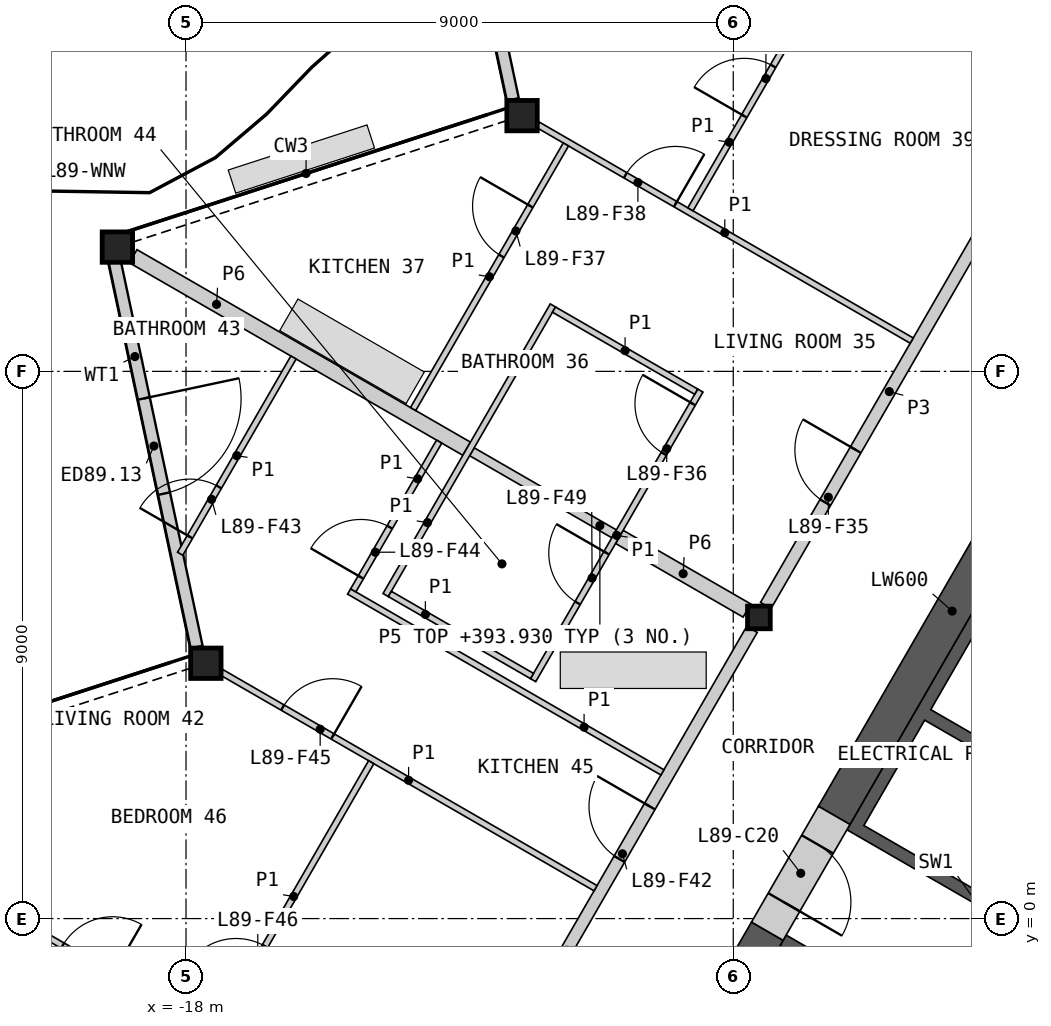
"""IFC4 building model, lengths in metres.
Left out: names, types, materials, properties, quantities, classifications, styles, units other than length and angle.
Written with IfcOpenShell. Run it as: python <this file> out.ifc"""

import sys

from ifc_helpers import new_model, si_unit, direction, frame, frame_2d, origin, origin_2d, place, context, subcontext, project, spatial, polyline, rectangle, hollow_rectangle, i_section, outline, extrude, element, fill, save


model = new_model("IFC4")
c1 = context("Model", 3, precision=1e-05, world=origin(), true_north=direction((0.0, 1.0)))
c2 = subcontext(c1, "Body", "Model", "MODEL_VIEW")
j1 = project(units=[si_unit("LENGTHUNIT", "METRE"), si_unit("PLANEANGLEUNIT", "RADIAN")], contexts=[c1])
p1 = place(None, origin())
s1 = spatial("IfcSite", under=j1, at=p1, CompositionType="ELEMENT")
p2 = place(p1, origin())
s2 = spatial("IfcBuilding", under=s1, at=p2, CompositionType="ELEMENT")
p3 = place(p2, frame((0.0, 0.0, 391.6)))
s3 = spatial("IfcBuildingStorey", under=s2, at=p3, CompositionType="ELEMENT", Elevation=391.6)
for number, where, z_axis, x_axis in (
    (1, (-12.474, 13.206, 0.0), (0.0, 0.0, 1.0), (1.0, 0.0, 0.0)),
    (2, (-19.129, 11.044, 0.0), (0.0, 0.0, 1.0), (1.0, 0.0, 0.0)),
    (3, (-17.674, 4.199, 0.0), (0.0, 0.0, 1.0), (1.0, 0.0, 0.0)),
):
    element("IfcColumn", number, at=place(p3, frame(where, z_axis=z_axis, x_axis=x_axis)), inside=s3, PredefinedType="COLUMN", context=c2, shape_type="SweptSolid", body=[
        extrude(hollow_rectangle(XDim=0.5, YDim=0.5, WallThickness=0.03, at=origin_2d()), origin(), (0.0, 0.0, 1.0), 3.4),
    ])
p4 = place(p3, frame((-8.578, 4.953, 0.0), z_axis=(0.0, 0.0, 1.0), x_axis=(1.0, 0.0, 0.0)))
e4 = element("IfcColumn", 4, at=p4, inside=s3, PredefinedType="COLUMN", context=c2, shape_type="SweptSolid", body=[
    extrude(i_section(OverallWidth=0.374, OverallDepth=0.372, WebThickness=0.016, FlangeThickness=0.026, at=origin_2d()), origin(), (0.0, 0.0, 1.0), 3.4),
])
p5 = place(p3, frame((-13.979, 19.843, 0.0), z_axis=(0.0, 0.0, 1.0), x_axis=(0.207910765171, -0.978147797486, 0.0)))
e5 = element("IfcWall", 5, at=p5, inside=s3, PredefinedType="SOLIDWALL", context=c2, shape_type="SweptSolid", body=[
    extrude(rectangle(XDim=6.512, YDim=0.2, at=frame_2d((3.256, 0.0))), origin(), (0.0, 0.0, 1.0), 2.634),
])
p6 = place(p5, frame((2.333, 0.0, 0.0)))
e6 = element("IfcOpeningElement", 6, at=p6, cuts=e5, PredefinedType="OPENING", context=c2, shape_type="SweptSolid", body=[
    extrude(rectangle(XDim=1.6, YDim=2.25, at=frame_2d((0.8, 1.125))), frame((0.0, 0.11, 0.0), z_axis=(0.0, -1.0, 0.0), x_axis=(1.0, 0.0, 0.0)), (0.0, 0.0, 1.0), 0.22),
])
p7 = place(p3, frame((-19.179, 10.836, 0.0), z_axis=(0.0, 0.0, 1.0), x_axis=(0.207910765171, -0.978147797486, 0.0)))
e7 = element("IfcWall", 7, at=p7, inside=s3, PredefinedType="SOLIDWALL", context=c2, shape_type="SweptSolid", body=[
    extrude(rectangle(XDim=6.512, YDim=0.2, at=frame_2d((3.256, 0.0))), origin(), (0.0, 0.0, 1.0), 2.634),
])
p8 = place(p7, frame((2.333, 0.0, 0.0)))
e8 = element("IfcOpeningElement", 8, at=p8, cuts=e7, PredefinedType="OPENING", context=c2, shape_type="SweptSolid", body=[
    extrude(rectangle(XDim=1.6, YDim=2.25, at=frame_2d((0.8, 1.125))), frame((0.0, 0.11, 0.0), z_axis=(0.0, -1.0, 0.0), x_axis=(1.0, 0.0, 0.0)), (0.0, 0.0, 1.0), 0.22),
])
p9 = place(p3, origin())
e9 = element("IfcWall", 9, at=p9, inside=s3, PredefinedType="SHEAR", context=c2, shape_type="SweptSolid", body=[
    extrude(outline(polyline([(-6.061, -1.697), (-8.231, -0.444), (-8.131, -0.271), (-5.96, -1.524), (-6.061, -1.697)])), origin(), (0.0, 0.0, 1.0), 3.1),
])
p10 = place(p3, origin())
e10 = element("IfcWall", 10, at=p10, inside=s3, PredefinedType="SHEAR", context=c2, shape_type="SweptSolid", body=[
    extrude(outline(polyline([(-4.96, 0.208), (-7.131, 1.461), (-3.731, 7.35), (-1.561, 6.097), (-1.66, 5.924), (-3.652, 7.074), (-5.752, 3.437), (-3.76, 2.287), (-3.861, 2.113), (-5.852, 3.263), (-6.852, 1.531), (-4.861, 0.381), (-4.96, 0.208)])), origin(), (0.0, 0.0, 1.0), 3.1),
])
p11 = place(p3, frame((-3.461, 8.417, 0.0), z_axis=(0.0, 0.0, 1.0), x_axis=(-0.50000391502, -0.866023143435, 0.0)))
e11 = element("IfcWall", 11, at=p11, inside=s3, PredefinedType="SHEAR", context=c2, shape_type="SweptSolid", body=[
    extrude(rectangle(XDim=7.759, YDim=0.6, at=frame_2d((3.879, 0.0))), origin(), (0.0, 0.0, 1.0), 3.1),
])
p12 = place(p3, frame((-8.44, -0.208, 0.0), z_axis=(0.0, 0.0, 1.0), x_axis=(-0.500007425856, -0.866021116422, 0.0)))
e12 = element("IfcWall", 12, at=p12, inside=s3, PredefinedType="SHEAR", context=c2, shape_type="SweptSolid", body=[
    extrude(rectangle(XDim=4.969, YDim=0.6, at=frame_2d((2.484, 0.0))), origin(), (0.0, 0.0, 1.0), 3.1),
])
p13 = place(p3, frame((-7.34, 1.698, 0.0), z_axis=(0.0, 0.0, 1.0), x_axis=(-0.50002983664, -0.866008176907, 0.0)))
e13 = element("IfcWall", 13, at=p13, inside=s3, PredefinedType="SHEAR", context=c2, shape_type="SweptSolid", body=[
    extrude(rectangle(XDim=2.2, YDim=0.6, at=frame_2d((1.1, 0.0))), origin(), (0.0, 0.0, 1.0), 3.1),
])
p14 = place(p13, frame((0.55, 0.0, 0.0)))
e14 = element("IfcOpeningElement", 14, at=p14, cuts=e13, PredefinedType="OPENING", context=c2, shape_type="SweptSolid", body=[
    extrude(rectangle(XDim=1.1, YDim=2.1, at=frame_2d((0.55, 1.05))), frame((0.0, 0.31, 0.0), z_axis=(0.0, -1.0, 0.0), x_axis=(1.0, 0.0, 0.0)), (0.0, 0.0, 1.0), 0.62),
])
p15 = place(p3, frame((-8.465, 5.15, 0.0), z_axis=(0.0, 0.0, 1.0), x_axis=(0.499992155518, 0.866029932751, 0.0)))
e15 = element("IfcWall", 15, at=p15, inside=s3, PredefinedType="PARTITIONING", context=c2, shape_type="SweptSolid", body=[
    extrude(rectangle(XDim=8.123, YDim=0.2, at=frame_2d((4.062, 0.0))), origin(), (0.0, 0.0, 1.0), 3.1),
])
p16 = place(p15, frame((1.956, 0.0, 0.0)))
e16 = element("IfcOpeningElement", 16, at=p16, cuts=e15, PredefinedType="OPENING", context=c2, shape_type="SweptSolid", body=[
    extrude(rectangle(XDim=1.0, YDim=2.1, at=frame_2d((0.5, 1.05))), frame((0.0, 0.11, 0.0), z_axis=(0.0, -1.0, 0.0), x_axis=(1.0, 0.0, 0.0)), (0.0, 0.0, 1.0), 0.22),
])
p17 = place(p3, frame((-12.754, -2.279, 0.0), z_axis=(0.0, 0.0, 1.0), x_axis=(0.500001682468, 0.866024432409, 0.0)))
e17 = element("IfcWall", 17, at=p17, inside=s3, PredefinedType="PARTITIONING", context=c2, shape_type="SweptSolid", body=[
    extrude(rectangle(XDim=8.124, YDim=0.2, at=frame_2d((4.062, 0.0))), origin(), (0.0, 0.0, 1.0), 3.1),
])
p18 = place(p17, frame((3.762, 0.0, 0.0)))
e18 = element("IfcOpeningElement", 18, at=p18, cuts=e17, PredefinedType="OPENING", context=c2, shape_type="SweptSolid", body=[
    extrude(rectangle(XDim=1.0, YDim=2.1, at=frame_2d((0.5, 1.05))), frame((0.0, 0.11, 0.0), z_axis=(0.0, -1.0, 0.0), x_axis=(1.0, 0.0, 0.0)), (0.0, 0.0, 1.0), 0.22),
])
p19 = place(p3, frame((-18.869, 10.894, 0.0), z_axis=(0.0, 0.0, 1.0), x_axis=(0.866023139795, -0.500003921324, 0.0)))
e19 = element("IfcWall", 19, at=p19, inside=s3, PredefinedType="PARTITIONING", context=c2, shape_type="SweptSolid", body=[
    extrude(rectangle(XDim=6.332, YDim=0.25, at=frame_2d((3.166, 0.0))), origin(), (0.0, 0.0, 1.0), 2.33),
])
p20 = place(p3, frame((-10.873, 6.278, 0.0), z_axis=(0.0, 0.0, 1.0), x_axis=(0.865989219354, -0.500062668036, 0.0)))
e20 = element("IfcWall", 20, at=p20, inside=s3, PredefinedType="PARTITIONING", context=c2, shape_type="SweptSolid", body=[
    extrude(rectangle(XDim=2.423, YDim=0.25, at=frame_2d((1.211, 0.0))), origin(), (0.0, 0.0, 1.0), 2.33),
])
p21 = place(p3, frame((-13.298, 7.678, 0.0), z_axis=(0.0, 0.0, 1.0), x_axis=(0.866059108428, -0.4999416173, 0.0)))
e21 = element("IfcWall", 21, at=p21, inside=s3, PredefinedType="PLUMBINGWALL", context=c2, shape_type="SweptSolid", body=[
    extrude(rectangle(XDim=2.7, YDim=0.15, at=frame_2d((1.35, 0.0))), origin(), (0.0, 0.0, 1.0), 2.33),
])
p22 = place(p3, frame((-13.669, 19.9, 0.0), z_axis=(0.0, 0.0, 1.0), x_axis=(0.866032376801, -0.499987922186, 0.0)))
e22 = element("IfcWall", 22, at=p22, inside=s3, PredefinedType="PARTITIONING", context=c2, shape_type="SweptSolid", body=[
    extrude(rectangle(XDim=11.782, YDim=0.1, at=frame_2d((5.891, 0.0))), origin(), (0.0, 0.0, 1.0), 2.33),
])
p23 = place(p22, frame((4.664, 0.0, 0.0)))
e23 = element("IfcOpeningElement", 23, at=p23, cuts=e22, PredefinedType="OPENING", context=c2, shape_type="SweptSolid", body=[
    extrude(rectangle(XDim=0.95, YDim=2.1, at=frame_2d((0.475, 1.05))), frame((0.0, 0.06, 0.0), z_axis=(0.0, -1.0, 0.0), x_axis=(1.0, 0.0, 0.0)), (0.0, 0.0, 1.0), 0.12),
])
p24 = place(p3, frame((-24.069, 1.887, 0.0), z_axis=(0.0, 0.0, 1.0), x_axis=(0.866023404247, -0.500003463284, 0.0)))
e24 = element("IfcWall", 24, at=p24, inside=s3, PredefinedType="PARTITIONING", context=c2, shape_type="SweptSolid", body=[
    extrude(rectangle(XDim=11.782, YDim=0.1, at=frame_2d((5.891, 0.0))), origin(), (0.0, 0.0, 1.0), 2.33),
])
p25 = place(p24, frame((4.664, 0.0, 0.0)))
e25 = element("IfcOpeningElement", 25, at=p25, cuts=e24, PredefinedType="OPENING", context=c2, shape_type="SweptSolid", body=[
    extrude(rectangle(XDim=0.95, YDim=2.1, at=frame_2d((0.475, 1.05))), frame((0.0, 0.06, 0.0), z_axis=(0.0, -1.0, 0.0), x_axis=(1.0, 0.0, 0.0)), (0.0, 0.0, 1.0), 0.12),
])
p26 = place(p3, frame((-12.214, 13.056, 0.0), z_axis=(0.0, 0.0, 1.0), x_axis=(0.866018949465, -0.500011179042, 0.0)))
e26 = element("IfcWall", 26, at=p26, inside=s3, PredefinedType="PARTITIONING", context=c2, shape_type="SweptSolid", body=[
    extrude(rectangle(XDim=7.1, YDim=0.1, at=frame_2d((3.55, 0.0))), origin(), (0.0, 0.0, 1.0), 2.33),
])
p27 = place(p26, frame((1.663, 0.0, 0.0)))
e27 = element("IfcOpeningElement", 27, at=p27, cuts=e26, PredefinedType="OPENING", context=c2, shape_type="SweptSolid", body=[
    extrude(rectangle(XDim=0.95, YDim=2.1, at=frame_2d((0.475, 1.05))), frame((0.0, 0.06, 0.0), z_axis=(0.0, -1.0, 0.0), x_axis=(1.0, 0.0, 0.0)), (0.0, 0.0, 1.0), 0.12),
])
p28 = place(p3, frame((-17.414, 4.049, 0.0), z_axis=(0.0, 0.0, 1.0), x_axis=(0.866033839264, -0.499985389037, 0.0)))
e28 = element("IfcWall", 28, at=p28, inside=s3, PredefinedType="PARTITIONING", context=c2, shape_type="SweptSolid", body=[
    extrude(rectangle(XDim=7.1, YDim=0.1, at=frame_2d((3.55, 0.0))), origin(), (0.0, 0.0, 1.0), 2.33),
])
p29 = place(p28, frame((1.158, 0.0, 0.0)))
e29 = element("IfcOpeningElement", 29, at=p29, cuts=e28, PredefinedType="OPENING", context=c2, shape_type="SweptSolid", body=[
    extrude(rectangle(XDim=0.95, YDim=2.1, at=frame_2d((0.475, 1.05))), frame((0.0, 0.06, 0.0), z_axis=(0.0, -1.0, 0.0), x_axis=(1.0, 0.0, 0.0)), (0.0, 0.0, 1.0), 0.12),
])
p30 = place(p3, frame((-15.318, 5.38, 0.0), z_axis=(0.0, 0.0, 1.0), x_axis=(0.866035260786, -0.499982926783, 0.0)))
e30 = element("IfcWall", 30, at=p30, inside=s3, PredefinedType="PARTITIONING", context=c2, shape_type="SweptSolid", body=[
    extrude(rectangle(XDim=5.95, YDim=0.1, at=frame_2d((2.975, 0.0))), origin(), (0.0, 0.0, 1.0), 2.33),
])
p31 = place(p3, frame((-14.717, 5.321, 0.0), z_axis=(0.0, 0.0, 1.0), x_axis=(0.500015767406, 0.866016300277, 0.0)))
e31 = element("IfcWall", 31, at=p31, inside=s3, PredefinedType="PARTITIONING", context=c2, shape_type="SweptSolid", body=[
    extrude(rectangle(XDim=5.5, YDim=0.1, at=frame_2d((2.75, 0.0))), origin(), (0.0, 0.0, 1.0), 2.33),
])
p32 = place(p3, frame((-12.292, 3.921, 0.0), z_axis=(0.0, 0.0, 1.0), x_axis=(0.499996545922, 0.866027397988, 0.0)))
e32 = element("IfcWall", 32, at=p32, inside=s3, PredefinedType="PARTITIONING", context=c2, shape_type="SweptSolid", body=[
    extrude(rectangle(XDim=5.5, YDim=0.1, at=frame_2d((2.75, 0.0))), origin(), (0.0, 0.0, 1.0), 2.33),
])
p33 = place(p32, frame((4.3, 0.0, 0.0)))
e33 = element("IfcOpeningElement", 33, at=p33, cuts=e32, PredefinedType="OPENING", context=c2, shape_type="SweptSolid", body=[
    extrude(rectangle(XDim=0.95, YDim=2.1, at=frame_2d((0.475, 1.05))), frame((0.0, 0.06, 0.0), z_axis=(0.0, -1.0, 0.0), x_axis=(1.0, 0.0, 0.0)), (0.0, 0.0, 1.0), 0.12),
])
p34 = place(p32, frame((1.465, 0.0, 0.0)))
e34 = element("IfcOpeningElement", 34, at=p34, cuts=e32, PredefinedType="OPENING", context=c2, shape_type="SweptSolid", body=[
    extrude(rectangle(XDim=0.95, YDim=2.1, at=frame_2d((0.475, 1.05))), frame((0.0, 0.06, 0.0), z_axis=(0.0, -1.0, 0.0), x_axis=(1.0, 0.0, 0.0)), (0.0, 0.0, 1.0), 0.12),
])
p35 = place(p3, frame((-9.704, 11.665, 0.0), z_axis=(0.0, 0.0, 1.0), x_axis=(0.499984882974, 0.866034131428, 0.0)))
e35 = element("IfcWall", 35, at=p35, inside=s3, PredefinedType="PARTITIONING", context=c2, shape_type="SweptSolid", body=[
    extrude(rectangle(XDim=5.1, YDim=0.1, at=frame_2d((2.55, 0.0))), origin(), (0.0, 0.0, 1.0), 2.33),
])
p36 = place(p35, frame((1.771, 0.0, 0.0)))
e36 = element("IfcOpeningElement", 36, at=p36, cuts=e35, PredefinedType="OPENING", context=c2, shape_type="SweptSolid", body=[
    extrude(rectangle(XDim=0.95, YDim=2.1, at=frame_2d((0.475, 1.05))), frame((0.0, 0.06, 0.0), z_axis=(0.0, -1.0, 0.0), x_axis=(1.0, 0.0, 0.0)), (0.0, 0.0, 1.0), 0.12),
])
p37 = place(p3, frame((-17.504, -1.845, 0.0), z_axis=(0.0, 0.0, 1.0), x_axis=(0.499984882974, 0.866034131428, 0.0)))
e37 = element("IfcWall", 37, at=p37, inside=s3, PredefinedType="PARTITIONING", context=c2, shape_type="SweptSolid", body=[
    extrude(rectangle(XDim=5.1, YDim=0.1, at=frame_2d((2.55, 0.0))), origin(), (0.0, 0.0, 1.0), 2.33),
])
p38 = place(p37, frame((0.656, 0.0, 0.0)))
e38 = element("IfcOpeningElement", 38, at=p38, cuts=e37, PredefinedType="OPENING", context=c2, shape_type="SweptSolid", body=[
    extrude(rectangle(XDim=0.95, YDim=2.1, at=frame_2d((0.475, 1.05))), frame((0.0, 0.06, 0.0), z_axis=(0.0, -1.0, 0.0), x_axis=(1.0, 0.0, 0.0)), (0.0, 0.0, 1.0), 0.12),
])
p39 = place(p3, frame((-14.265, 8.38, 0.0), z_axis=(0.0, 0.0, 1.0), x_axis=(0.500026652407, 0.866010015463, 0.0)))
e39 = element("IfcWall", 39, at=p39, inside=s3, PredefinedType="PARTITIONING", context=c2, shape_type="SweptSolid", body=[
    extrude(rectangle(XDim=5.025, YDim=0.1, at=frame_2d((2.513, 0.0))), origin(), (0.0, 0.0, 1.0), 2.33),
])
p40 = place(p39, frame((2.906, 0.0, 0.0)))
e40 = element("IfcOpeningElement", 40, at=p40, cuts=e39, PredefinedType="OPENING", context=c2, shape_type="SweptSolid", body=[
    extrude(rectangle(XDim=0.95, YDim=2.1, at=frame_2d((0.475, 1.05))), frame((0.0, 0.06, 0.0), z_axis=(0.0, -1.0, 0.0), x_axis=(1.0, 0.0, 0.0)), (0.0, 0.0, 1.0), 0.12),
])
p41 = place(p3, frame((-18.096, 6.0, 0.0), z_axis=(0.0, 0.0, 1.0), x_axis=(0.500000333706, 0.866025211119, 0.0)))
e41 = element("IfcWall", 41, at=p41, inside=s3, PredefinedType="PARTITIONING", context=c2, shape_type="SweptSolid", body=[
    extrude(rectangle(XDim=3.727, YDim=0.1, at=frame_2d((1.863, 0.0))), origin(), (0.0, 0.0, 1.0), 2.33),
])
p42 = place(p41, frame((0.321, 0.0, 0.0)))
e42 = element("IfcOpeningElement", 42, at=p42, cuts=e41, PredefinedType="OPENING", context=c2, shape_type="SweptSolid", body=[
    extrude(rectangle(XDim=0.95, YDim=2.1, at=frame_2d((0.475, 1.05))), frame((0.0, 0.06, 0.0), z_axis=(0.0, -1.0, 0.0), x_axis=(1.0, 0.0, 0.0)), (0.0, 0.0, 1.0), 0.12),
])
p43 = place(p3, frame((-15.25, 5.398, 0.0), z_axis=(0.0, 0.0, 1.0), x_axis=(0.499959355765, 0.866048868473, 0.0)))
e43 = element("IfcWall", 43, at=p43, inside=s3, PredefinedType="PARTITIONING", context=c2, shape_type="SweptSolid", body=[
    extrude(rectangle(XDim=2.825, YDim=0.1, at=frame_2d((1.413, 0.0))), origin(), (0.0, 0.0, 1.0), 2.33),
])
p44 = place(p43, frame((0.25, 0.0, 0.0)))
e44 = element("IfcOpeningElement", 44, at=p44, cuts=e43, PredefinedType="OPENING", context=c2, shape_type="SweptSolid", body=[
    extrude(rectangle(XDim=0.95, YDim=2.1, at=frame_2d((0.475, 1.05))), frame((0.0, 0.06, 0.0), z_axis=(0.0, -1.0, 0.0), x_axis=(1.0, 0.0, 0.0)), (0.0, 0.0, 1.0), 0.12),
])
for number, where, z_axis, x_axis in (
    (45, (-11.948, 10.016, 0.0), (0.0, 0.0, 1.0), (0.866, -0.5, 0.0)),
    (46, (-14.648, 5.34, 0.0), (0.0, 0.0, 1.0), (0.866, -0.5, 0.0)),
):
    element("IfcWall", number, at=place(p3, frame(where, z_axis=z_axis, x_axis=x_axis)), inside=s3, PredefinedType="PARTITIONING", context=c2, shape_type="SweptSolid", body=[
        extrude(rectangle(XDim=2.7, YDim=0.1, at=frame_2d((1.35, 0.0))), origin(), (0.0, 0.0, 1.0), 2.33),
    ])
p45 = place(p8, origin())
e47 = element("IfcDoor", 47, at=p45, inside=s3, OperationType="DOUBLE_DOOR_SINGLE_SWING", PredefinedType="DOOR", context=c2, shape_type="SweptSolid", body=[
    extrude(rectangle(XDim=1.6, YDim=2.25, at=frame_2d((0.8, 1.125))), frame((0.0, 0.025, 0.0), z_axis=(0.0, -1.0, 0.0), x_axis=(1.0, 0.0, 0.0)), (0.0, 0.0, 1.0), 0.05),
])
fill(e8, e47)
p46 = place(p14, origin())
e48 = element("IfcDoor", 48, at=p46, inside=s3, OperationType="SINGLE_SWING_RIGHT", PredefinedType="DOOR", context=c2, shape_type="SweptSolid", body=[
    extrude(rectangle(XDim=1.1, YDim=2.1, at=frame_2d((0.55, 1.05))), frame((0.0, 0.055, 0.0), z_axis=(0.0, -1.0, 0.0), x_axis=(1.0, 0.0, 0.0)), (0.0, 0.0, 1.0), 0.05),
])
fill(e14, e48)
p47 = place(p16, origin())
e49 = element("IfcDoor", 49, at=p47, inside=s3, OperationType="SINGLE_SWING_RIGHT", PredefinedType="DOOR", context=c2, shape_type="SweptSolid", body=[
    extrude(rectangle(XDim=1.0, YDim=2.1, at=frame_2d((0.5, 1.05))), frame((0.0, 0.025, 0.0), z_axis=(0.0, -1.0, 0.0), x_axis=(1.0, 0.0, 0.0)), (0.0, 0.0, 1.0), 0.05),
])
fill(e16, e49)
p48 = place(p33, origin())
e50 = element("IfcDoor", 50, at=p48, inside=s3, OperationType="SINGLE_SWING_RIGHT", PredefinedType="DOOR", context=c2, shape_type="SweptSolid", body=[
    extrude(rectangle(XDim=0.95, YDim=2.1, at=frame_2d((0.475, 1.05))), frame((0.0, 0.025, 0.0), z_axis=(0.0, -1.0, 0.0), x_axis=(1.0, 0.0, 0.0)), (0.0, 0.0, 1.0), 0.05),
])
fill(e33, e50)
p49 = place(p40, origin())
e51 = element("IfcDoor", 51, at=p49, inside=s3, OperationType="SINGLE_SWING_RIGHT", PredefinedType="DOOR", context=c2, shape_type="SweptSolid", body=[
    extrude(rectangle(XDim=0.95, YDim=2.1, at=frame_2d((0.475, 1.05))), frame((0.0, 0.025, 0.0), z_axis=(0.0, -1.0, 0.0), x_axis=(1.0, 0.0, 0.0)), (0.0, 0.0, 1.0), 0.05),
])
fill(e40, e51)
p50 = place(p27, origin())
e52 = element("IfcDoor", 52, at=p50, inside=s3, OperationType="SINGLE_SWING_RIGHT", PredefinedType="DOOR", context=c2, shape_type="SweptSolid", body=[
    extrude(rectangle(XDim=0.95, YDim=2.1, at=frame_2d((0.475, 1.05))), frame((0.0, 0.025, 0.0), z_axis=(0.0, -1.0, 0.0), x_axis=(1.0, 0.0, 0.0)), (0.0, 0.0, 1.0), 0.05),
])
fill(e27, e52)
p51 = place(p36, origin())
e53 = element("IfcDoor", 53, at=p51, inside=s3, OperationType="SINGLE_SWING_LEFT", PredefinedType="DOOR", context=c2, shape_type="SweptSolid", body=[
    extrude(rectangle(XDim=0.95, YDim=2.1, at=frame_2d((0.475, 1.05))), frame((0.0, 0.025, 0.0), z_axis=(0.0, -1.0, 0.0), x_axis=(1.0, 0.0, 0.0)), (0.0, 0.0, 1.0), 0.05),
])
fill(e36, e53)
p52 = place(p18, origin())
e54 = element("IfcDoor", 54, at=p52, inside=s3, OperationType="SINGLE_SWING_RIGHT", PredefinedType="DOOR", context=c2, shape_type="SweptSolid", body=[
    extrude(rectangle(XDim=1.0, YDim=2.1, at=frame_2d((0.5, 1.05))), frame((0.0, 0.025, 0.0), z_axis=(0.0, -1.0, 0.0), x_axis=(1.0, 0.0, 0.0)), (0.0, 0.0, 1.0), 0.05),
])
fill(e18, e54)
p53 = place(p42, origin())
e55 = element("IfcDoor", 55, at=p53, inside=s3, OperationType="SINGLE_SWING_LEFT", PredefinedType="DOOR", context=c2, shape_type="SweptSolid", body=[
    extrude(rectangle(XDim=0.95, YDim=2.1, at=frame_2d((0.475, 1.05))), frame((0.0, 0.025, 0.0), z_axis=(0.0, -1.0, 0.0), x_axis=(1.0, 0.0, 0.0)), (0.0, 0.0, 1.0), 0.05),
])
fill(e42, e55)
p54 = place(p44, origin())
e56 = element("IfcDoor", 56, at=p54, inside=s3, OperationType="SINGLE_SWING_LEFT", PredefinedType="DOOR", context=c2, shape_type="SweptSolid", body=[
    extrude(rectangle(XDim=0.95, YDim=2.1, at=frame_2d((0.475, 1.05))), frame((0.0, 0.025, 0.0), z_axis=(0.0, -1.0, 0.0), x_axis=(1.0, 0.0, 0.0)), (0.0, 0.0, 1.0), 0.05),
])
fill(e44, e56)
p55 = place(p29, origin())
e57 = element("IfcDoor", 57, at=p55, inside=s3, OperationType="SINGLE_SWING_RIGHT", PredefinedType="DOOR", context=c2, shape_type="SweptSolid", body=[
    extrude(rectangle(XDim=0.95, YDim=2.1, at=frame_2d((0.475, 1.05))), frame((0.0, 0.025, 0.0), z_axis=(0.0, -1.0, 0.0), x_axis=(1.0, 0.0, 0.0)), (0.0, 0.0, 1.0), 0.05),
])
fill(e29, e57)
p56 = place(p38, origin())
e58 = element("IfcDoor", 58, at=p56, inside=s3, OperationType="SINGLE_SWING_LEFT", PredefinedType="DOOR", context=c2, shape_type="SweptSolid", body=[
    extrude(rectangle(XDim=0.95, YDim=2.1, at=frame_2d((0.475, 1.05))), frame((0.0, 0.025, 0.0), z_axis=(0.0, -1.0, 0.0), x_axis=(1.0, 0.0, 0.0)), (0.0, 0.0, 1.0), 0.05),
])
fill(e38, e58)
p57 = place(p25, origin())
e59 = element("IfcDoor", 59, at=p57, inside=s3, OperationType="SINGLE_SWING_RIGHT", PredefinedType="DOOR", context=c2, shape_type="SweptSolid", body=[
    extrude(rectangle(XDim=0.95, YDim=2.1, at=frame_2d((0.475, 1.05))), frame((0.0, 0.025, 0.0), z_axis=(0.0, -1.0, 0.0), x_axis=(1.0, 0.0, 0.0)), (0.0, 0.0, 1.0), 0.05),
])
fill(e25, e59)
p58 = place(p34, origin())
e60 = element("IfcDoor", 60, at=p58, inside=s3, OperationType="SINGLE_SWING_RIGHT", PredefinedType="DOOR", context=c2, shape_type="SweptSolid", body=[
    extrude(rectangle(XDim=0.95, YDim=2.1, at=frame_2d((0.475, 1.05))), frame((0.0, 0.025, 0.0), z_axis=(0.0, -1.0, 0.0), x_axis=(1.0, 0.0, 0.0)), (0.0, 0.0, 1.0), 0.05),
])
fill(e34, e60)
save(model, sys.argv[1])
